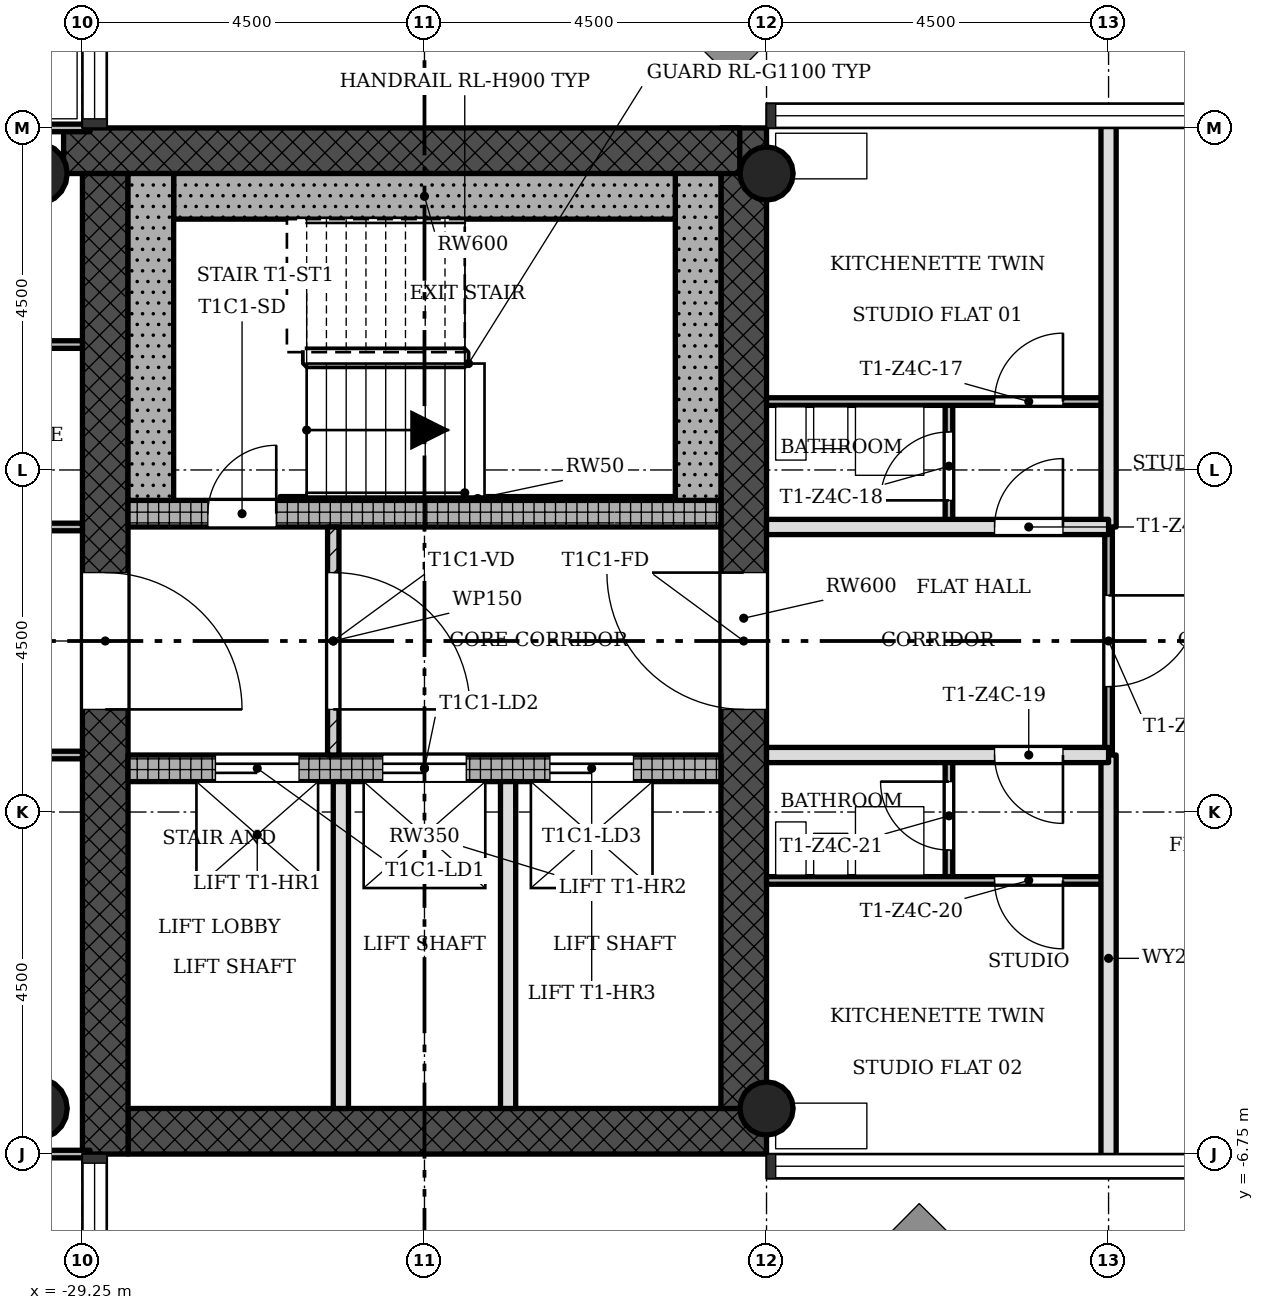
"""IFC4 building model, lengths in metres.
Left out: names, types, materials, properties, quantities, classifications, styles, units other than length and angle.
Written with IfcOpenShell. Run it as: python <this file> out.ifc"""

import sys

from ifc_helpers import new_model, si_unit, direction, frame, frame_2d, origin, origin_2d, place, context, subcontext, project, spatial, rectangle, hollow_circle, extrude, element, fill, save


model = new_model("IFC4")
c1 = context("Model", 3, precision=1e-05, world=origin(), true_north=direction((0.0, 1.0)))
c2 = subcontext(c1, "Body", "Model", "MODEL_VIEW")
j1 = project(units=[si_unit("LENGTHUNIT", "METRE"), si_unit("PLANEANGLEUNIT", "RADIAN")], contexts=[c1])
p1 = place(None, origin())
s1 = spatial("IfcSite", under=j1, at=p1, CompositionType="ELEMENT")
p2 = place(p1, origin())
s2 = spatial("IfcBuilding", under=s1, at=p2, CompositionType="ELEMENT")
p3 = place(p2, frame((0.0, 0.0, 189.2)))
s3 = spatial("IfcBuildingStorey", under=s2, at=p3, CompositionType="ELEMENT", Elevation=189.2)
p4 = place(p3, frame((-28.65, -6.45, 0.0), z_axis=(0.0, 0.0, 1.0), x_axis=(1.0, 0.0, 0.0)))
e1 = element("IfcWall", 1, at=p4, inside=s3, PredefinedType="SHEAR", context=c2, shape_type="SweptSolid", body=[
    extrude(rectangle(XDim=8.4, YDim=0.6, at=frame_2d((4.2, 0.0))), origin(), (0.0, 0.0, 1.0), 3.4),
])
p5 = place(p3, frame((-20.55, -6.15, 0.0), z_axis=(0.0, 0.0, 1.0), x_axis=(0.0, 1.0, 0.0)))
e2 = element("IfcWall", 2, at=p5, inside=s3, PredefinedType="SHEAR", context=c2, shape_type="SweptSolid", body=[
    extrude(rectangle(XDim=12.9, YDim=0.6, at=frame_2d((6.45, 0.0))), origin(), (0.0, 0.0, 1.0), 3.4),
])
p6 = place(p5, frame((5.25, 0.0, 0.0)))
e3 = element("IfcOpeningElement", 3, at=p6, cuts=e2, PredefinedType="OPENING", context=c2, shape_type="SweptSolid", body=[
    extrude(rectangle(XDim=1.8, YDim=2.1, at=frame_2d((0.9, 1.05))), frame((0.0, 0.31, 0.0), z_axis=(0.0, -1.0, 0.0), x_axis=(1.0, 0.0, 0.0)), (0.0, 0.0, 1.0), 0.62),
])
p7 = place(p3, frame((-20.602, 6.45, 0.0), z_axis=(0.0, 0.0, 1.0), x_axis=(-1.0, 0.0, 0.0)))
e4 = element("IfcWall", 4, at=p7, inside=s3, PredefinedType="SHEAR", context=c2, shape_type="SweptSolid", body=[
    extrude(rectangle(XDim=8.896, YDim=0.6, at=frame_2d((4.448, 0.0))), origin(), (0.0, 0.0, 1.0), 3.4),
])
p8 = place(p3, frame((-28.95, 6.15, 0.0), z_axis=(0.0, 0.0, 1.0), x_axis=(0.0, -1.0, 0.0)))
e5 = element("IfcWall", 5, at=p8, inside=s3, PredefinedType="SHEAR", context=c2, shape_type="SweptSolid", body=[
    extrude(rectangle(XDim=12.9, YDim=0.6, at=frame_2d((6.45, 0.0))), origin(), (0.0, 0.0, 1.0), 3.4),
])
p9 = place(p8, frame((5.25, 0.0, 0.0)))
e6 = element("IfcOpeningElement", 6, at=p9, cuts=e5, PredefinedType="OPENING", context=c2, shape_type="SweptSolid", body=[
    extrude(rectangle(XDim=1.8, YDim=2.1, at=frame_2d((0.9, 1.05))), frame((0.0, 0.31, 0.0), z_axis=(0.0, -1.0, 0.0), x_axis=(1.0, 0.0, 0.0)), (0.0, 0.0, 1.0), 0.62),
])
p10 = place(p3, frame((-28.65, -1.675, 0.0), z_axis=(0.0, 0.0, 1.0), x_axis=(1.0, 0.0, 0.0)))
e7 = element("IfcWall", 7, at=p10, inside=s3, PredefinedType="SHEAR", context=c2, shape_type="SweptSolid", body=[
    extrude(rectangle(XDim=7.8, YDim=0.35, at=frame_2d((3.9, 0.0))), origin(), (0.0, 0.0, 1.0), 3.4),
])
p11 = place(p10, frame((1.15, 0.0, 0.0)))
e8 = element("IfcOpeningElement", 8, at=p11, cuts=e7, PredefinedType="OPENING", context=c2, shape_type="SweptSolid", body=[
    extrude(rectangle(XDim=1.1, YDim=2.1, at=frame_2d((0.55, 1.05))), frame((0.0, 0.185, 0.0), z_axis=(0.0, -1.0, 0.0), x_axis=(1.0, 0.0, 0.0)), (0.0, 0.0, 1.0), 0.37),
])
p12 = place(p10, frame((3.35, 0.0, 0.0)))
e9 = element("IfcOpeningElement", 9, at=p12, cuts=e7, PredefinedType="OPENING", context=c2, shape_type="SweptSolid", body=[
    extrude(rectangle(XDim=1.1, YDim=2.1, at=frame_2d((0.55, 1.05))), frame((0.0, 0.185, 0.0), z_axis=(0.0, -1.0, 0.0), x_axis=(1.0, 0.0, 0.0)), (0.0, 0.0, 1.0), 0.37),
])
p13 = place(p10, frame((5.55, 0.0, 0.0)))
e10 = element("IfcOpeningElement", 10, at=p13, cuts=e7, PredefinedType="OPENING", context=c2, shape_type="SweptSolid", body=[
    extrude(rectangle(XDim=1.1, YDim=2.1, at=frame_2d((0.55, 1.05))), frame((0.0, 0.185, 0.0), z_axis=(0.0, -1.0, 0.0), x_axis=(1.0, 0.0, 0.0)), (0.0, 0.0, 1.0), 0.37),
])
p14 = place(p3, frame((-28.65, 1.675, 0.0), z_axis=(0.0, 0.0, 1.0), x_axis=(1.0, 0.0, 0.0)))
e11 = element("IfcWall", 11, at=p14, inside=s3, PredefinedType="SHEAR", context=c2, shape_type="SweptSolid", body=[
    extrude(rectangle(XDim=7.8, YDim=0.35, at=frame_2d((3.9, 0.0))), origin(), (0.0, 0.0, 1.0), 3.4),
])
p15 = place(p14, frame((1.05, 0.0, 0.0)))
e12 = element("IfcOpeningElement", 12, at=p15, cuts=e11, PredefinedType="OPENING", context=c2, shape_type="SweptSolid", body=[
    extrude(rectangle(XDim=0.9, YDim=2.1, at=frame_2d((0.45, 1.05))), frame((0.0, 0.185, 0.0), z_axis=(0.0, -1.0, 0.0), x_axis=(1.0, 0.0, 0.0)), (0.0, 0.0, 1.0), 0.37),
])
for number, where, z_axis, x_axis in (
    (13, (-20.25, -6.15, 0.0), (0.0, 0.0, 1.0), (1.0, 0.0, 0.0)),
    (14, (-20.25, 6.15, 0.0), (0.0, 0.0, 1.0), (1.0, 0.0, 0.0)),
):
    element("IfcColumn", number, at=place(p3, frame(where, z_axis=z_axis, x_axis=x_axis)), inside=s3, PredefinedType="COLUMN", context=c2, shape_type="SweptSolid", body=[
        extrude(hollow_circle(Radius=0.35, WallThickness=0.025, at=origin_2d()), origin(), (0.0, 0.0, 1.0), 3.4),
    ])
for number, where, z_axis, x_axis in (
    (15, (-29.85, -6.15, 0.0), (0.0, 0.0, 1.0), (1.0, 0.0, 0.0)),
    (16, (-29.85, 6.15, 0.0), (0.0, 0.0, 1.0), (1.0, 0.0, 0.0)),
):
    element("IfcColumn", number, at=place(p3, frame(where, z_axis=z_axis, x_axis=x_axis)), inside=s3, PredefinedType="COLUMN", context=c2, shape_type="SweptSolid", body=[
        extrude(hollow_circle(Radius=0.4, WallThickness=0.028, at=origin_2d()), origin(), (0.0, 0.0, 1.0), 3.4),
    ])
p16 = place(p3, frame((-25.95, -1.5, 0.0), z_axis=(0.0, 0.0, 1.0), x_axis=(0.0, 1.0, 0.0)))
e17 = element("IfcWall", 17, at=p16, inside=s3, PredefinedType="PARTITIONING", context=c2, shape_type="SweptSolid", body=[
    extrude(rectangle(XDim=3.0, YDim=0.15, at=frame_2d((1.5, 0.0))), origin(), (0.0, 0.0, 1.0), 3.0),
])
p17 = place(p16, frame((0.6, 0.0, 0.0)))
e18 = element("IfcOpeningElement", 18, at=p17, cuts=e17, PredefinedType="OPENING", context=c2, shape_type="SweptSolid", body=[
    extrude(rectangle(XDim=1.8, YDim=2.1, at=frame_2d((0.9, 1.05))), frame((0.0, 0.085, 0.0), z_axis=(0.0, -1.0, 0.0), x_axis=(1.0, 0.0, 0.0)), (0.0, 0.0, 1.0), 0.17),
])
for number, where, z_axis, x_axis in (
    (19, (-25.85, -6.15, 0.0), (0.0, 0.0, 1.0), (0.0, 1.0, 0.0)),
    (20, (-23.65, -6.15, 0.0), (0.0, 0.0, 1.0), (0.0, 1.0, 0.0)),
):
    element("IfcWall", number, at=place(p3, frame(where, z_axis=z_axis, x_axis=x_axis)), inside=s3, PredefinedType="SOLIDWALL", context=c2, shape_type="SweptSolid", body=[
        extrude(rectangle(XDim=4.3, YDim=0.2, at=frame_2d((2.15, 0.0))), origin(), (0.0, 0.0, 1.0), 3.0),
    ])
p18 = place(p3, frame((-17.85, -3.15, 0.0), z_axis=(0.0, 0.0, 1.0), x_axis=(0.0, 1.0, 0.0)))
e21 = element("IfcWall", 21, at=p18, inside=s3, PredefinedType="PARTITIONING", context=c2, shape_type="SweptSolid", body=[
    extrude(rectangle(XDim=1.65, YDim=0.1, at=frame_2d((0.825, 0.0))), origin(), (0.0, 0.0, 1.0), 3.0),
])
p19 = place(p18, frame((0.4, 0.0, 0.0)))
e22 = element("IfcOpeningElement", 22, at=p19, cuts=e21, PredefinedType="OPENING", context=c2, shape_type="SweptSolid", body=[
    extrude(rectangle(XDim=0.9, YDim=2.1, at=frame_2d((0.45, 1.05))), frame((0.0, 0.06, 0.0), z_axis=(0.0, -1.0, 0.0), x_axis=(1.0, 0.0, 0.0)), (0.0, 0.0, 1.0), 0.12),
])
p20 = place(p3, frame((-17.85, 1.5, 0.0), z_axis=(0.0, 0.0, 1.0), x_axis=(0.0, 1.0, 0.0)))
e23 = element("IfcWall", 23, at=p20, inside=s3, PredefinedType="PARTITIONING", context=c2, shape_type="SweptSolid", body=[
    extrude(rectangle(XDim=1.65, YDim=0.1, at=frame_2d((0.825, 0.0))), origin(), (0.0, 0.0, 1.0), 3.0),
])
p21 = place(p20, frame((0.35, 0.0, 0.0)))
e24 = element("IfcOpeningElement", 24, at=p21, cuts=e23, PredefinedType="OPENING", context=c2, shape_type="SweptSolid", body=[
    extrude(rectangle(XDim=0.9, YDim=2.1, at=frame_2d((0.45, 1.05))), frame((0.0, 0.06, 0.0), z_axis=(0.0, -1.0, 0.0), x_axis=(1.0, 0.0, 0.0)), (0.0, 0.0, 1.0), 0.12),
])
p22 = place(p3, frame((-15.75, -1.5, 0.0), z_axis=(0.0, 0.0, 1.0), x_axis=(0.0, 1.0, 0.0)))
e25 = element("IfcWall", 25, at=p22, inside=s3, PredefinedType="PARTITIONING", context=c2, shape_type="SweptSolid", body=[
    extrude(rectangle(XDim=3.0, YDim=0.1, at=frame_2d((1.5, 0.0))), origin(), (0.0, 0.0, 1.0), 3.0),
])
p23 = place(p22, frame((0.9, 0.0, 0.0)))
e26 = element("IfcOpeningElement", 26, at=p23, cuts=e25, PredefinedType="OPENING", context=c2, shape_type="SweptSolid", body=[
    extrude(rectangle(XDim=1.2, YDim=2.1, at=frame_2d((0.6, 1.05))), frame((0.0, 0.06, 0.0), z_axis=(0.0, -1.0, 0.0), x_axis=(1.0, 0.0, 0.0)), (0.0, 0.0, 1.0), 0.12),
])
for number, where, z_axis, x_axis in (
    (27, (-15.75, -6.85, 0.0), (0.0, 0.0, 1.0), (0.0, 1.0, 0.0)),
    (28, (-15.75, 1.5, 0.0), (0.0, 0.0, 1.0), (0.0, 1.0, 0.0)),
):
    element("IfcWall", number, at=place(p3, frame(where, z_axis=z_axis, x_axis=x_axis)), inside=s3, PredefinedType="SOLIDWALL", context=c2, shape_type="SweptSolid", body=[
        extrude(rectangle(XDim=5.35, YDim=0.2, at=frame_2d((2.675, 0.0))), origin(), (0.0, 0.0, 1.0), 3.0),
    ])
p24 = place(p3, frame((-35.1, -6.75, 0.0), z_axis=(0.0, 0.0, 1.0), x_axis=(1.0, 0.0, 0.0)))
e29 = element("IfcWall", 29, at=p24, inside=s3, PredefinedType="PARTITIONING", context=c2, shape_type="SweptSolid", body=[
    extrude(rectangle(XDim=5.95, YDim=0.1, at=frame_2d((2.975, 0.0))), origin(), (0.0, 0.0, 1.0), 3.0),
])
p25 = place(p3, frame((-20.25, -3.15, 0.0), z_axis=(0.0, 0.0, 1.0), x_axis=(1.0, 0.0, 0.0)))
e30 = element("IfcWall", 30, at=p25, inside=s3, PredefinedType="PARTITIONING", context=c2, shape_type="SweptSolid", body=[
    extrude(rectangle(XDim=4.5, YDim=0.1, at=frame_2d((2.25, 0.0))), origin(), (0.0, 0.0, 1.0), 3.0),
])
p26 = place(p25, frame((3.0, 0.0, 0.0)))
e31 = element("IfcOpeningElement", 31, at=p26, cuts=e30, PredefinedType="OPENING", context=c2, shape_type="SweptSolid", body=[
    extrude(rectangle(XDim=0.9, YDim=2.1, at=frame_2d((0.45, 1.05))), frame((0.0, 0.06, 0.0), z_axis=(0.0, -1.0, 0.0), x_axis=(1.0, 0.0, 0.0)), (0.0, 0.0, 1.0), 0.12),
])
p27 = place(p3, frame((-31.5, -1.5, 0.0), z_axis=(0.0, 0.0, 1.0), x_axis=(1.0, 0.0, 0.0)))
e32 = element("IfcWall", 32, at=p27, inside=s3, PredefinedType="PARTITIONING", context=c2, shape_type="SweptSolid", body=[
    extrude(rectangle(XDim=2.25, YDim=0.1, at=frame_2d((1.125, 0.0))), origin(), (0.0, 0.0, 1.0), 3.0),
])
p28 = place(p3, frame((-20.25, -1.5, 0.0), z_axis=(0.0, 0.0, 1.0), x_axis=(1.0, 0.0, 0.0)))
e33 = element("IfcWall", 33, at=p28, inside=s3, PredefinedType="SOLIDWALL", context=c2, shape_type="SweptSolid", body=[
    extrude(rectangle(XDim=4.5, YDim=0.2, at=frame_2d((2.25, 0.0))), origin(), (0.0, 0.0, 1.0), 3.0),
])
p29 = place(p28, frame((3.0, 0.0, 0.0)))
e34 = element("IfcOpeningElement", 34, at=p29, cuts=e33, PredefinedType="OPENING", context=c2, shape_type="SweptSolid", body=[
    extrude(rectangle(XDim=0.9, YDim=2.1, at=frame_2d((0.45, 1.05))), frame((0.0, 0.11, 0.0), z_axis=(0.0, -1.0, 0.0), x_axis=(1.0, 0.0, 0.0)), (0.0, 0.0, 1.0), 0.22),
])
p30 = place(p3, frame((-31.5, 1.5, 0.0), z_axis=(0.0, 0.0, 1.0), x_axis=(1.0, 0.0, 0.0)))
e35 = element("IfcWall", 35, at=p30, inside=s3, PredefinedType="PARTITIONING", context=c2, shape_type="SweptSolid", body=[
    extrude(rectangle(XDim=2.25, YDim=0.1, at=frame_2d((1.125, 0.0))), origin(), (0.0, 0.0, 1.0), 3.0),
])
p31 = place(p30, frame((0.675, 0.0, 0.0)))
e36 = element("IfcOpeningElement", 36, at=p31, cuts=e35, PredefinedType="OPENING", context=c2, shape_type="SweptSolid", body=[
    extrude(rectangle(XDim=0.9, YDim=2.1, at=frame_2d((0.45, 1.05))), frame((0.0, 0.06, 0.0), z_axis=(0.0, -1.0, 0.0), x_axis=(1.0, 0.0, 0.0)), (0.0, 0.0, 1.0), 0.12),
])
p32 = place(p3, frame((-20.25, 1.5, 0.0), z_axis=(0.0, 0.0, 1.0), x_axis=(1.0, 0.0, 0.0)))
e37 = element("IfcWall", 37, at=p32, inside=s3, PredefinedType="SOLIDWALL", context=c2, shape_type="SweptSolid", body=[
    extrude(rectangle(XDim=4.5, YDim=0.2, at=frame_2d((2.25, 0.0))), origin(), (0.0, 0.0, 1.0), 3.0),
])
p33 = place(p32, frame((3.0, 0.0, 0.0)))
e38 = element("IfcOpeningElement", 38, at=p33, cuts=e37, PredefinedType="OPENING", context=c2, shape_type="SweptSolid", body=[
    extrude(rectangle(XDim=0.9, YDim=2.1, at=frame_2d((0.45, 1.05))), frame((0.0, 0.11, 0.0), z_axis=(0.0, -1.0, 0.0), x_axis=(1.0, 0.0, 0.0)), (0.0, 0.0, 1.0), 0.22),
])
p34 = place(p3, frame((-20.25, 3.15, 0.0), z_axis=(0.0, 0.0, 1.0), x_axis=(1.0, 0.0, 0.0)))
e39 = element("IfcWall", 39, at=p34, inside=s3, PredefinedType="PARTITIONING", context=c2, shape_type="SweptSolid", body=[
    extrude(rectangle(XDim=4.5, YDim=0.1, at=frame_2d((2.25, 0.0))), origin(), (0.0, 0.0, 1.0), 3.0),
])
p35 = place(p34, frame((3.0, 0.0, 0.0)))
e40 = element("IfcOpeningElement", 40, at=p35, cuts=e39, PredefinedType="OPENING", context=c2, shape_type="SweptSolid", body=[
    extrude(rectangle(XDim=0.9, YDim=2.1, at=frame_2d((0.45, 1.05))), frame((0.0, 0.06, 0.0), z_axis=(0.0, -1.0, 0.0), x_axis=(1.0, 0.0, 0.0)), (0.0, 0.0, 1.0), 0.12),
])
p36 = place(p3, frame((-31.5, 3.9, 0.0), z_axis=(0.0, 0.0, 1.0), x_axis=(1.0, 0.0, 0.0)))
e41 = element("IfcWall", 41, at=p36, inside=s3, PredefinedType="PARTITIONING", context=c2, shape_type="SweptSolid", body=[
    extrude(rectangle(XDim=2.25, YDim=0.1, at=frame_2d((1.125, 0.0))), origin(), (0.0, 0.0, 1.0), 3.0),
])
p37 = place(p3, frame((-35.1, 6.75, 0.0), z_axis=(0.0, 0.0, 1.0), x_axis=(1.0, 0.0, 0.0)))
e42 = element("IfcWall", 42, at=p37, inside=s3, PredefinedType="PARTITIONING", context=c2, shape_type="SweptSolid", body=[
    extrude(rectangle(XDim=5.95, YDim=0.1, at=frame_2d((2.975, 0.0))), origin(), (0.0, 0.0, 1.0), 3.0),
])
p38 = place(p3, frame((-21.15, 1.85, 0.0), z_axis=(0.0, 0.0, 1.0), x_axis=(0.0, 1.0, 0.0)))
e43 = element("IfcWall", 43, at=p38, inside=s3, PredefinedType="SHEAR", context=c2, shape_type="SweptSolid", body=[
    extrude(rectangle(XDim=4.3, YDim=0.6, at=frame_2d((2.15, 0.0))), origin(), (0.0, 0.0, 1.0), 3.4),
])
p39 = place(p3, frame((-28.05, 5.85, 0.0), z_axis=(0.0, 0.0, 1.0), x_axis=(1.0, 0.0, 0.0)))
e44 = element("IfcWall", 44, at=p39, inside=s3, PredefinedType="SHEAR", context=c2, shape_type="SweptSolid", body=[
    extrude(rectangle(XDim=6.6, YDim=0.6, at=frame_2d((3.3, 0.0))), origin(), (0.0, 0.0, 1.0), 3.4),
])
p40 = place(p3, frame((-28.35, 1.85, 0.0), z_axis=(0.0, 0.0, 1.0), x_axis=(0.0, 1.0, 0.0)))
e45 = element("IfcWall", 45, at=p40, inside=s3, PredefinedType="SHEAR", context=c2, shape_type="SweptSolid", body=[
    extrude(rectangle(XDim=4.3, YDim=0.6, at=frame_2d((2.15, 0.0))), origin(), (0.0, 0.0, 1.0), 3.4),
])
p41 = place(p3, frame((-26.65, 1.875, 0.0), z_axis=(0.0, 0.0, 1.0), x_axis=(1.0, 0.0, 0.0)))
e46 = element("IfcWall", 46, at=p41, inside=s3, PredefinedType="SHEAR", context=c2, shape_type="SweptSolid", body=[
    extrude(rectangle(XDim=5.2, YDim=0.05, at=frame_2d((2.6, 0.0))), origin(), (0.0, 0.0, 1.0), 3.4),
])
p42 = place(p17, origin())
e47 = element("IfcDoor", 47, at=p42, inside=s3, OperationType="SINGLE_SWING_LEFT", PredefinedType="DOOR", context=c2, shape_type="SweptSolid", body=[
    extrude(rectangle(XDim=1.8, YDim=2.1, at=frame_2d((0.9, 1.05))), frame((0.0, 0.025, 0.0), z_axis=(0.0, -1.0, 0.0), x_axis=(1.0, 0.0, 0.0)), (0.0, 0.0, 1.0), 0.05),
])
fill(e18, e47)
p43 = place(p33, origin())
e48 = element("IfcDoor", 48, at=p43, inside=s3, OperationType="SINGLE_SWING_LEFT", PredefinedType="DOOR", context=c2, shape_type="SweptSolid", body=[
    extrude(rectangle(XDim=0.9, YDim=2.1, at=frame_2d((0.45, 1.05))), frame((0.0, 0.025, 0.0), z_axis=(0.0, -1.0, 0.0), x_axis=(1.0, 0.0, 0.0)), (0.0, 0.0, 1.0), 0.05),
])
fill(e38, e48)
p44 = place(p35, origin())
e49 = element("IfcDoor", 49, at=p44, inside=s3, OperationType="SINGLE_SWING_LEFT", PredefinedType="DOOR", context=c2, shape_type="SweptSolid", body=[
    extrude(rectangle(XDim=0.9, YDim=2.1, at=frame_2d((0.45, 1.05))), frame((0.0, 0.025, 0.0), z_axis=(0.0, -1.0, 0.0), x_axis=(1.0, 0.0, 0.0)), (0.0, 0.0, 1.0), 0.05),
])
fill(e40, e49)
p45 = place(p21, origin())
e50 = element("IfcDoor", 50, at=p45, inside=s3, OperationType="SINGLE_SWING_RIGHT", PredefinedType="DOOR", context=c2, shape_type="SweptSolid", body=[
    extrude(rectangle(XDim=0.9, YDim=2.1, at=frame_2d((0.45, 1.05))), frame((0.0, 0.025, 0.0), z_axis=(0.0, -1.0, 0.0), x_axis=(1.0, 0.0, 0.0)), (0.0, 0.0, 1.0), 0.05),
])
fill(e24, e50)
p46 = place(p29, origin())
e51 = element("IfcDoor", 51, at=p46, inside=s3, OperationType="SINGLE_SWING_RIGHT", PredefinedType="DOOR", context=c2, shape_type="SweptSolid", body=[
    extrude(rectangle(XDim=0.9, YDim=2.1, at=frame_2d((0.45, 1.05))), frame((0.0, 0.025, 0.0), z_axis=(0.0, -1.0, 0.0), x_axis=(1.0, 0.0, 0.0)), (0.0, 0.0, 1.0), 0.05),
])
fill(e34, e51)
p47 = place(p26, origin())
e52 = element("IfcDoor", 52, at=p47, inside=s3, OperationType="SINGLE_SWING_RIGHT", PredefinedType="DOOR", context=c2, shape_type="SweptSolid", body=[
    extrude(rectangle(XDim=0.9, YDim=2.1, at=frame_2d((0.45, 1.05))), frame((0.0, 0.025, 0.0), z_axis=(0.0, -1.0, 0.0), x_axis=(1.0, 0.0, 0.0)), (0.0, 0.0, 1.0), 0.05),
])
fill(e31, e52)
p48 = place(p19, origin())
e53 = element("IfcDoor", 53, at=p48, inside=s3, OperationType="SINGLE_SWING_LEFT", PredefinedType="DOOR", context=c2, shape_type="SweptSolid", body=[
    extrude(rectangle(XDim=0.9, YDim=2.1, at=frame_2d((0.45, 1.05))), frame((0.0, 0.025, 0.0), z_axis=(0.0, -1.0, 0.0), x_axis=(1.0, 0.0, 0.0)), (0.0, 0.0, 1.0), 0.05),
])
fill(e22, e53)
p49 = place(p23, origin())
e54 = element("IfcDoor", 54, at=p49, inside=s3, OperationType="SINGLE_SWING_RIGHT", PredefinedType="DOOR", context=c2, shape_type="SweptSolid", body=[
    extrude(rectangle(XDim=1.2, YDim=2.1, at=frame_2d((0.6, 1.05))), frame((0.0, 0.025, 0.0), z_axis=(0.0, -1.0, 0.0), x_axis=(1.0, 0.0, 0.0)), (0.0, 0.0, 1.0), 0.05),
])
fill(e26, e54)
p50 = place(p15, origin())
e55 = element("IfcDoor", 55, at=p50, inside=s3, OperationType="SINGLE_SWING_LEFT", PredefinedType="DOOR", context=c2, shape_type="SweptSolid", body=[
    extrude(rectangle(XDim=0.9, YDim=2.1, at=frame_2d((0.45, 1.05))), frame((0.0, 0.025, 0.0), z_axis=(0.0, -1.0, 0.0), x_axis=(1.0, 0.0, 0.0)), (0.0, 0.0, 1.0), 0.05),
])
fill(e12, e55)
p51 = place(p11, origin())
e56 = element("IfcDoor", 56, at=p51, inside=s3, OperationType="SLIDING_TO_LEFT", PredefinedType="DOOR", context=c2, shape_type="SweptSolid", body=[
    extrude(rectangle(XDim=1.1, YDim=2.1, at=frame_2d((0.55, 1.05))), frame((0.0, 0.025, 0.0), z_axis=(0.0, -1.0, 0.0), x_axis=(1.0, 0.0, 0.0)), (0.0, 0.0, 1.0), 0.05),
])
fill(e8, e56)
p52 = place(p12, origin())
e57 = element("IfcDoor", 57, at=p52, inside=s3, OperationType="SLIDING_TO_LEFT", PredefinedType="DOOR", context=c2, shape_type="SweptSolid", body=[
    extrude(rectangle(XDim=1.1, YDim=2.1, at=frame_2d((0.55, 1.05))), frame((0.0, 0.025, 0.0), z_axis=(0.0, -1.0, 0.0), x_axis=(1.0, 0.0, 0.0)), (0.0, 0.0, 1.0), 0.05),
])
fill(e9, e57)
p53 = place(p13, origin())
e58 = element("IfcDoor", 58, at=p53, inside=s3, OperationType="SLIDING_TO_LEFT", PredefinedType="DOOR", context=c2, shape_type="SweptSolid", body=[
    extrude(rectangle(XDim=1.1, YDim=2.1, at=frame_2d((0.55, 1.05))), frame((0.0, 0.025, 0.0), z_axis=(0.0, -1.0, 0.0), x_axis=(1.0, 0.0, 0.0)), (0.0, 0.0, 1.0), 0.05),
])
fill(e10, e58)
p54 = place(p9, origin())
e59 = element("IfcDoor", 59, at=p54, inside=s3, OperationType="SINGLE_SWING_LEFT", PredefinedType="DOOR", context=c2, shape_type="SweptSolid", body=[
    extrude(rectangle(XDim=1.8, YDim=2.1, at=frame_2d((0.9, 1.05))), frame((0.0, 0.025, 0.0), z_axis=(0.0, -1.0, 0.0), x_axis=(1.0, 0.0, 0.0)), (0.0, 0.0, 1.0), 0.05),
])
fill(e6, e59)
p55 = place(p6, origin())
e60 = element("IfcDoor", 60, at=p55, inside=s3, OperationType="SINGLE_SWING_LEFT", PredefinedType="DOOR", context=c2, shape_type="SweptSolid", body=[
    extrude(rectangle(XDim=1.8, YDim=2.1, at=frame_2d((0.9, 1.05))), frame((0.0, 0.025, 0.0), z_axis=(0.0, -1.0, 0.0), x_axis=(1.0, 0.0, 0.0)), (0.0, 0.0, 1.0), 0.05),
])
fill(e3, e60)
save(model, sys.argv[1])
